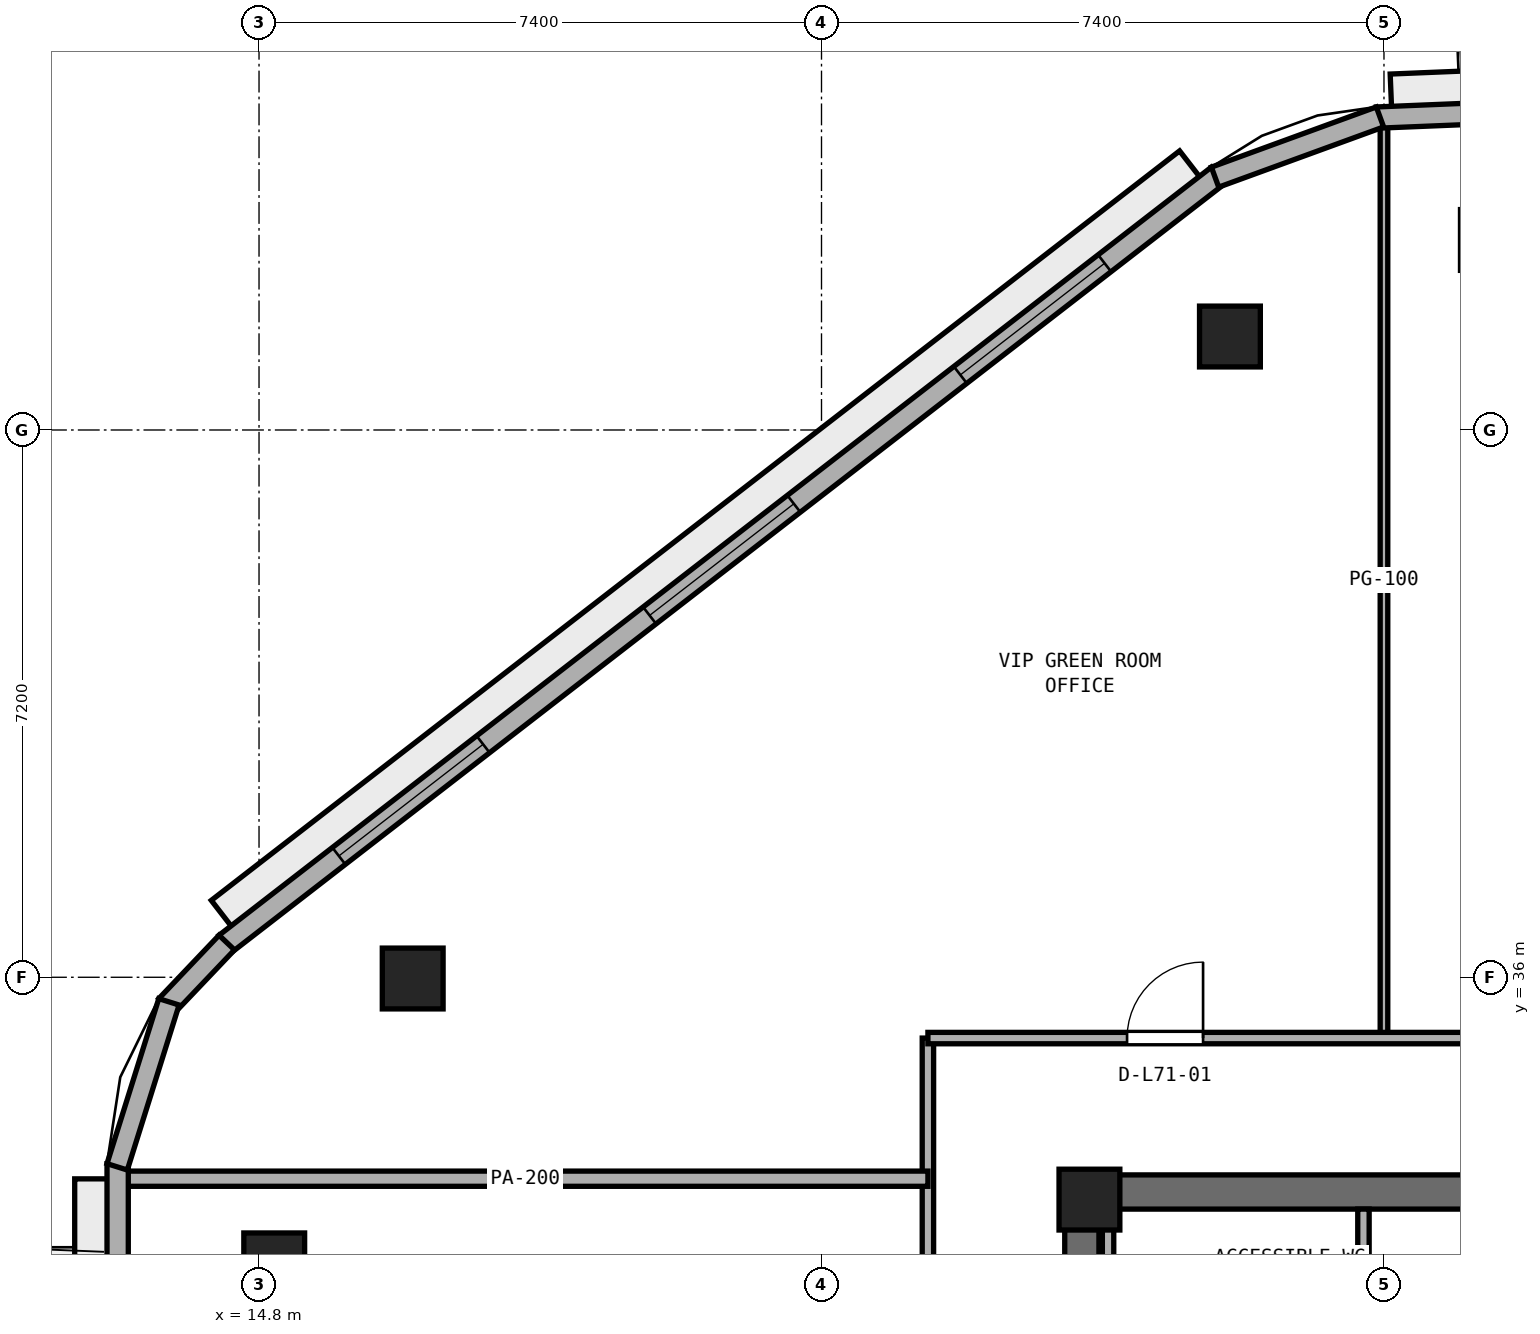
"""IFC4 building model, lengths in metres.
Left out: names, types, materials, properties, quantities, classifications, styles, units other than length and angle.
Written with IfcOpenShell. Run it as: python <this file> out.ifc"""

import sys

from ifc_helpers import new_model, si_unit, direction, frame, frame_2d, origin, origin_2d, place, context, subcontext, project, spatial, rectangle, extrude, element, fill, save


model = new_model("IFC4")
c1 = context("Model", 3, precision=1e-05, world=origin(), true_north=direction((0.0, 1.0)))
c2 = subcontext(c1, "Body", "Model", "MODEL_VIEW")
j1 = project(units=[si_unit("LENGTHUNIT", "METRE"), si_unit("PLANEANGLEUNIT", "RADIAN")], contexts=[c1])
p1 = place(None, origin())
s1 = spatial("IfcSite", under=j1, at=p1, CompositionType="ELEMENT")
p2 = place(p1, origin())
s2 = spatial("IfcBuilding", under=s1, at=p2, CompositionType="ELEMENT")
p3 = place(p2, frame((0.0, 0.0, 278.2)))
s3 = spatial("IfcBuildingStorey", under=s2, at=p3, CompositionType="ELEMENT", Elevation=278.2)
p4 = place(p3, frame((25.4, 33.175, 0.0), z_axis=(0.0, 0.0, 1.0), x_axis=(1.0, 0.0, 0.0)))
e1 = element("IfcWall", 1, at=p4, inside=s3, PredefinedType="SHEAR", context=c2, shape_type="SweptSolid", body=[
    extrude(rectangle(XDim=23.2, YDim=0.45, at=frame_2d((11.6, 0.0))), origin(), (0.0, 0.0, 1.0), 3.54),
])
p5 = place(p3, frame((25.625, 17.45, 0.0), z_axis=(0.0, 0.0, 1.0), x_axis=(0.0, 1.0, 0.0)))
e2 = element("IfcWall", 2, at=p5, inside=s3, PredefinedType="SHEAR", context=c2, shape_type="SweptSolid", body=[
    extrude(rectangle(XDim=15.5, YDim=0.45, at=frame_2d((7.75, 0.0))), origin(), (0.0, 0.0, 1.0), 3.54),
])
p6 = place(p5, frame((7.0, 0.0, 0.0)))
e3 = element("IfcOpeningElement", 3, at=p6, cuts=e2, PredefinedType="OPENING", context=c2, shape_type="SweptSolid", body=[
    extrude(rectangle(XDim=1.5, YDim=2.15, at=frame_2d((0.75, 1.075))), frame((0.0, 0.235, 0.0), z_axis=(0.0, -1.0, 0.0), x_axis=(1.0, 0.0, 0.0)), (0.0, 0.0, 1.0), 0.47),
])
p7 = place(p3, frame((25.725, 33.075, 0.0), z_axis=(0.0, 0.0, 1.0), x_axis=(1.0, 0.0, 0.0)))
e4 = element("IfcColumn", 4, at=p7, inside=s3, PredefinedType="PILASTER", context=c2, shape_type="SweptSolid", body=[
    extrude(rectangle(XDim=0.8, YDim=0.8, at=origin_2d()), origin(), (0.0, 0.0, 1.0), 3.8),
])
for number, where, z_axis, x_axis in (
    (5, (27.573, 44.43, 0.0), (0.0, 0.0, 1.0), (1.0, 0.0, 0.0)),
    (6, (16.822, 35.984, 0.0), (0.0, 0.0, 1.0), (1.0, 0.0, 0.0)),
    (7, (15.0, 32.236, 0.0), (0.0, 0.0, 1.0), (1.0, 0.0, 0.0)),
):
    element("IfcColumn", number, at=place(p3, frame(where, z_axis=z_axis, x_axis=x_axis)), inside=s3, PredefinedType="COLUMN", context=c2, shape_type="SweptSolid", body=[
        extrude(rectangle(XDim=0.8, YDim=0.8, at=origin_2d()), origin(), (0.0, 0.0, 1.0), 3.8),
    ])
p8 = place(p3, frame((25.97, 30.65, 0.0), z_axis=(0.0, 0.0, 1.0), x_axis=(0.0, 1.0, 0.0)))
e8 = element("IfcWall", 8, at=p8, inside=s3, PredefinedType="PARTITIONING", context=c2, shape_type="SweptSolid", body=[
    extrude(rectangle(XDim=2.3, YDim=0.15, at=frame_2d((1.15, 0.0))), origin(), (0.0, 0.0, 1.0), 2.64),
])
p9 = place(p3, frame((29.33, 30.65, 0.0), z_axis=(0.0, 0.0, 1.0), x_axis=(0.0, 1.0, 0.0)))
e9 = element("IfcWall", 9, at=p9, inside=s3, PredefinedType="PARTITIONING", context=c2, shape_type="SweptSolid", body=[
    extrude(rectangle(XDim=2.3, YDim=0.15, at=frame_2d((1.15, 0.0))), origin(), (0.0, 0.0, 1.0), 3.54),
])
p10 = place(p3, frame((29.6, 35.2, 0.0), z_axis=(0.0, 0.0, 1.0), x_axis=(0.0, 1.0, 0.0)))
e10 = element("IfcWall", 10, at=p10, inside=s3, PredefinedType="PARTITIONING", context=c2, shape_type="SweptSolid", body=[
    extrude(rectangle(XDim=12.049, YDim=0.1, at=frame_2d((6.024, 0.0))), origin(), (0.0, 0.0, 1.0), 3.54),
])
p11 = place(p3, frame((23.6, 15.2, 0.0), z_axis=(0.0, 0.0, 1.0), x_axis=(0.0, 1.0, 0.0)))
e11 = element("IfcWall", 11, at=p11, inside=s3, PredefinedType="PARTITIONING", context=c2, shape_type="SweptSolid", body=[
    extrude(rectangle(XDim=20.0, YDim=0.15, at=frame_2d((10.0, 0.0))), origin(), (0.0, 0.0, 1.0), 3.54),
])
p12 = place(p11, frame((9.55, 0.0, 0.0)))
e12 = element("IfcOpeningElement", 12, at=p12, cuts=e11, PredefinedType="OPENING", context=c2, shape_type="SweptSolid", body=[
    extrude(rectangle(XDim=0.9, YDim=2.1, at=frame_2d((0.45, 1.05))), frame((0.0, 0.085, 0.0), z_axis=(0.0, -1.0, 0.0), x_axis=(1.0, 0.0, 0.0)), (0.0, 0.0, 1.0), 0.17),
])
p13 = place(p3, frame((13.005, 33.35, 0.0), z_axis=(0.0, 0.0, 1.0), x_axis=(1.0, 0.0, 0.0)))
e13 = element("IfcWall", 13, at=p13, inside=s3, PredefinedType="PARTITIONING", context=c2, shape_type="SweptSolid", body=[
    extrude(rectangle(XDim=10.595, YDim=0.2, at=frame_2d((5.298, 0.0))), origin(), (0.0, 0.0, 1.0), 3.54),
])
p14 = place(p3, frame((23.6, 35.2, 0.0), z_axis=(0.0, 0.0, 1.0), x_axis=(1.0, 0.0, 0.0)))
e14 = element("IfcWall", 14, at=p14, inside=s3, PredefinedType="PARTITIONING", context=c2, shape_type="SweptSolid", body=[
    extrude(rectangle(XDim=12.05, YDim=0.15, at=frame_2d((6.025, 0.0))), origin(), (0.0, 0.0, 1.0), 3.54),
])
p15 = place(p14, frame((2.62, 0.0, 0.0)))
e15 = element("IfcOpeningElement", 15, at=p15, cuts=e14, PredefinedType="OPENING", context=c2, shape_type="SweptSolid", body=[
    extrude(rectangle(XDim=1.0, YDim=2.12, at=frame_2d((0.5, 1.06))), frame((0.0, 0.085, 0.0), z_axis=(0.0, -1.0, 0.0), x_axis=(1.0, 0.0, 0.0)), (0.0, 0.0, 1.0), 0.17),
])
p16 = place(p3, frame((46.414, 48.005, 0.0), z_axis=(0.0, 0.0, 1.0), x_axis=(-0.999156194126, -0.041071885021, 0.0)))
e16 = element("IfcWall", 16, at=p16, inside=s3, PredefinedType="STANDARD", context=c2, shape_type="SweptSolid", body=[
    extrude(rectangle(XDim=16.923, YDim=0.28, at=frame_2d((8.461, 0.0))), origin(), (0.0, 0.0, 1.0), 3.54),
])
p17 = place(p16, frame((8.562, 0.0, 0.0)))
e17 = element("IfcOpeningElement", 17, at=p17, cuts=e16, PredefinedType="OPENING", context=c2, shape_type="SweptSolid", body=[
    extrude(rectangle(XDim=1.1, YDim=2.2, at=frame_2d((0.55, 1.1))), frame((0.0, 0.15, 0.0), z_axis=(0.0, -1.0, 0.0), x_axis=(1.0, 0.0, 0.0)), (0.0, 0.0, 1.0), 0.3),
])
p18 = place(p16, frame((1.954, 0.0, 0.9)))
e18 = element("IfcOpeningElement", 18, at=p18, cuts=e16, PredefinedType="OPENING", context=c2, shape_type="SweptSolid", body=[
    extrude(rectangle(XDim=2.4, YDim=1.75, at=frame_2d((1.2, 0.875))), frame((0.0, 0.15, 0.0), z_axis=(0.0, -1.0, 0.0), x_axis=(1.0, 0.0, 0.0)), (0.0, 0.0, 1.0), 0.3),
])
p19 = place(p16, frame((12.569, 0.0, 0.9)))
e19 = element("IfcOpeningElement", 19, at=p19, cuts=e16, PredefinedType="OPENING", context=c2, shape_type="SweptSolid", body=[
    extrude(rectangle(XDim=2.4, YDim=1.75, at=frame_2d((1.2, 0.875))), frame((0.0, 0.15, 0.0), z_axis=(0.0, -1.0, 0.0), x_axis=(1.0, 0.0, 0.0)), (0.0, 0.0, 1.0), 0.3),
])
p20 = place(p3, frame((27.415, 46.547, 0.0), z_axis=(0.0, 0.0, 1.0), x_axis=(-0.790789745248, -0.612087884875, 0.0)))
e20 = element("IfcWall", 20, at=p20, inside=s3, PredefinedType="STANDARD", context=c2, shape_type="SweptSolid", body=[
    extrude(rectangle(XDim=16.509, YDim=0.28, at=frame_2d((8.254, 0.0))), origin(), (0.0, 0.0, 1.0), 3.54),
])
p21 = place(p20, frame((1.885, 0.0, 0.9)))
e21 = element("IfcOpeningElement", 21, at=p21, cuts=e20, PredefinedType="OPENING", context=c2, shape_type="SweptSolid", body=[
    extrude(rectangle(XDim=2.4, YDim=1.75, at=frame_2d((1.2, 0.875))), frame((0.0, 0.15, 0.0), z_axis=(0.0, -1.0, 0.0), x_axis=(1.0, 0.0, 0.0)), (0.0, 0.0, 1.0), 0.3),
])
p22 = place(p20, frame((7.055, 0.0, 0.9)))
e22 = element("IfcOpeningElement", 22, at=p22, cuts=e20, PredefinedType="OPENING", context=c2, shape_type="SweptSolid", body=[
    extrude(rectangle(XDim=2.4, YDim=1.75, at=frame_2d((1.2, 0.875))), frame((0.0, 0.15, 0.0), z_axis=(0.0, -1.0, 0.0), x_axis=(1.0, 0.0, 0.0)), (0.0, 0.0, 1.0), 0.3),
])
p23 = place(p20, frame((12.224, 0.0, 0.9)))
e23 = element("IfcOpeningElement", 23, at=p23, cuts=e20, PredefinedType="OPENING", context=c2, shape_type="SweptSolid", body=[
    extrude(rectangle(XDim=2.4, YDim=1.75, at=frame_2d((1.2, 0.875))), frame((0.0, 0.15, 0.0), z_axis=(0.0, -1.0, 0.0), x_axis=(1.0, 0.0, 0.0)), (0.0, 0.0, 1.0), 0.3),
])
p24 = place(p3, frame((12.94, 33.548, 0.0), z_axis=(0.0, 0.0, 1.0), x_axis=(0.0, -1.0, 0.0)))
e24 = element("IfcWall", 24, at=p24, inside=s3, PredefinedType="STANDARD", context=c2, shape_type="SweptSolid", body=[
    extrude(rectangle(XDim=17.496, YDim=0.28, at=frame_2d((8.748, 0.0))), origin(), (0.0, 0.0, 1.0), 3.54),
])
p25 = place(p24, frame((8.198, 0.0, 0.0)))
e25 = element("IfcOpeningElement", 25, at=p25, cuts=e24, PredefinedType="OPENING", context=c2, shape_type="SweptSolid", body=[
    extrude(rectangle(XDim=1.1, YDim=2.2, at=frame_2d((0.55, 1.1))), frame((0.0, 0.15, 0.0), z_axis=(0.0, -1.0, 0.0), x_axis=(1.0, 0.0, 0.0)), (0.0, 0.0, 1.0), 0.3),
])
p26 = place(p24, frame((2.049, 0.0, 0.9)))
e26 = element("IfcOpeningElement", 26, at=p26, cuts=e24, PredefinedType="OPENING", context=c2, shape_type="SweptSolid", body=[
    extrude(rectangle(XDim=2.4, YDim=1.75, at=frame_2d((1.2, 0.875))), frame((0.0, 0.15, 0.0), z_axis=(0.0, -1.0, 0.0), x_axis=(1.0, 0.0, 0.0)), (0.0, 0.0, 1.0), 0.3),
])
p27 = place(p24, frame((13.047, 0.0, 0.9)))
e27 = element("IfcOpeningElement", 27, at=p27, cuts=e24, PredefinedType="OPENING", context=c2, shape_type="SweptSolid", body=[
    extrude(rectangle(XDim=2.4, YDim=1.75, at=frame_2d((1.2, 0.875))), frame((0.0, 0.15, 0.0), z_axis=(0.0, -1.0, 0.0), x_axis=(1.0, 0.0, 0.0)), (0.0, 0.0, 1.0), 0.3),
])
p28 = place(p3, frame((29.547, 47.318, 0.0), z_axis=(0.0, 0.0, 1.0), x_axis=(-0.93940703724, -0.342803760748, 0.0)))
e28 = element("IfcWall", 28, at=p28, inside=s3, PredefinedType="STANDARD", context=c2, shape_type="SweptSolid", body=[
    extrude(rectangle(XDim=2.31, YDim=0.28, at=frame_2d((1.155, 0.0))), origin(), (0.0, 0.0, 1.0), 3.54),
])
p29 = place(p3, frame((14.375, 36.457, 0.0), z_axis=(0.0, 0.0, 1.0), x_axis=(-0.68895569752, -0.724803453948, 0.0)))
e29 = element("IfcWall", 29, at=p29, inside=s3, PredefinedType="STANDARD", context=c2, shape_type="SweptSolid", body=[
    extrude(rectangle(XDim=1.151, YDim=0.28, at=frame_2d((0.575, 0.0))), origin(), (0.0, 0.0, 1.0), 3.54),
])
p30 = place(p3, frame((13.615, 35.677, 0.0), z_axis=(0.0, 0.0, 1.0), x_axis=(-0.299374552426, -0.954135670311, 0.0)))
e30 = element("IfcWall", 30, at=p30, inside=s3, PredefinedType="STANDARD", context=c2, shape_type="SweptSolid", body=[
    extrude(rectangle(XDim=2.275, YDim=0.28, at=frame_2d((1.138, 0.0))), origin(), (0.0, 0.0, 1.0), 3.54),
])
p31 = place(p15, origin())
e31 = element("IfcDoor", 31, at=p31, inside=s3, OperationType="SINGLE_SWING_RIGHT", PredefinedType="DOOR", context=c2, shape_type="SweptSolid", body=[
    extrude(rectangle(XDim=1.0, YDim=2.12, at=frame_2d((0.5, 1.06))), frame((0.0, 0.025, 0.0), z_axis=(0.0, -1.0, 0.0), x_axis=(1.0, 0.0, 0.0)), (0.0, 0.0, 1.0), 0.05),
])
fill(e15, e31)
p32 = place(p21, origin())
e32 = element("IfcWindow", 32, at=p32, inside=s3, PartitioningType="SINGLE_PANEL", PredefinedType="WINDOW", context=c2, shape_type="SweptSolid", body=[
    extrude(rectangle(XDim=2.4, YDim=1.75, at=frame_2d((1.2, 0.875))), frame((0.0, 0.03, 0.0), z_axis=(0.0, -1.0, 0.0), x_axis=(1.0, 0.0, 0.0)), (0.0, 0.0, 1.0), 0.06),
])
fill(e21, e32)
p33 = place(p22, origin())
e33 = element("IfcWindow", 33, at=p33, inside=s3, PartitioningType="SINGLE_PANEL", PredefinedType="WINDOW", context=c2, shape_type="SweptSolid", body=[
    extrude(rectangle(XDim=2.4, YDim=1.75, at=frame_2d((1.2, 0.875))), frame((0.0, 0.03, 0.0), z_axis=(0.0, -1.0, 0.0), x_axis=(1.0, 0.0, 0.0)), (0.0, 0.0, 1.0), 0.06),
])
fill(e22, e33)
p34 = place(p23, origin())
e34 = element("IfcWindow", 34, at=p34, inside=s3, PartitioningType="SINGLE_PANEL", PredefinedType="WINDOW", context=c2, shape_type="SweptSolid", body=[
    extrude(rectangle(XDim=2.4, YDim=1.75, at=frame_2d((1.2, 0.875))), frame((0.0, 0.03, 0.0), z_axis=(0.0, -1.0, 0.0), x_axis=(1.0, 0.0, 0.0)), (0.0, 0.0, 1.0), 0.06),
])
fill(e23, e34)
save(model, sys.argv[1])
